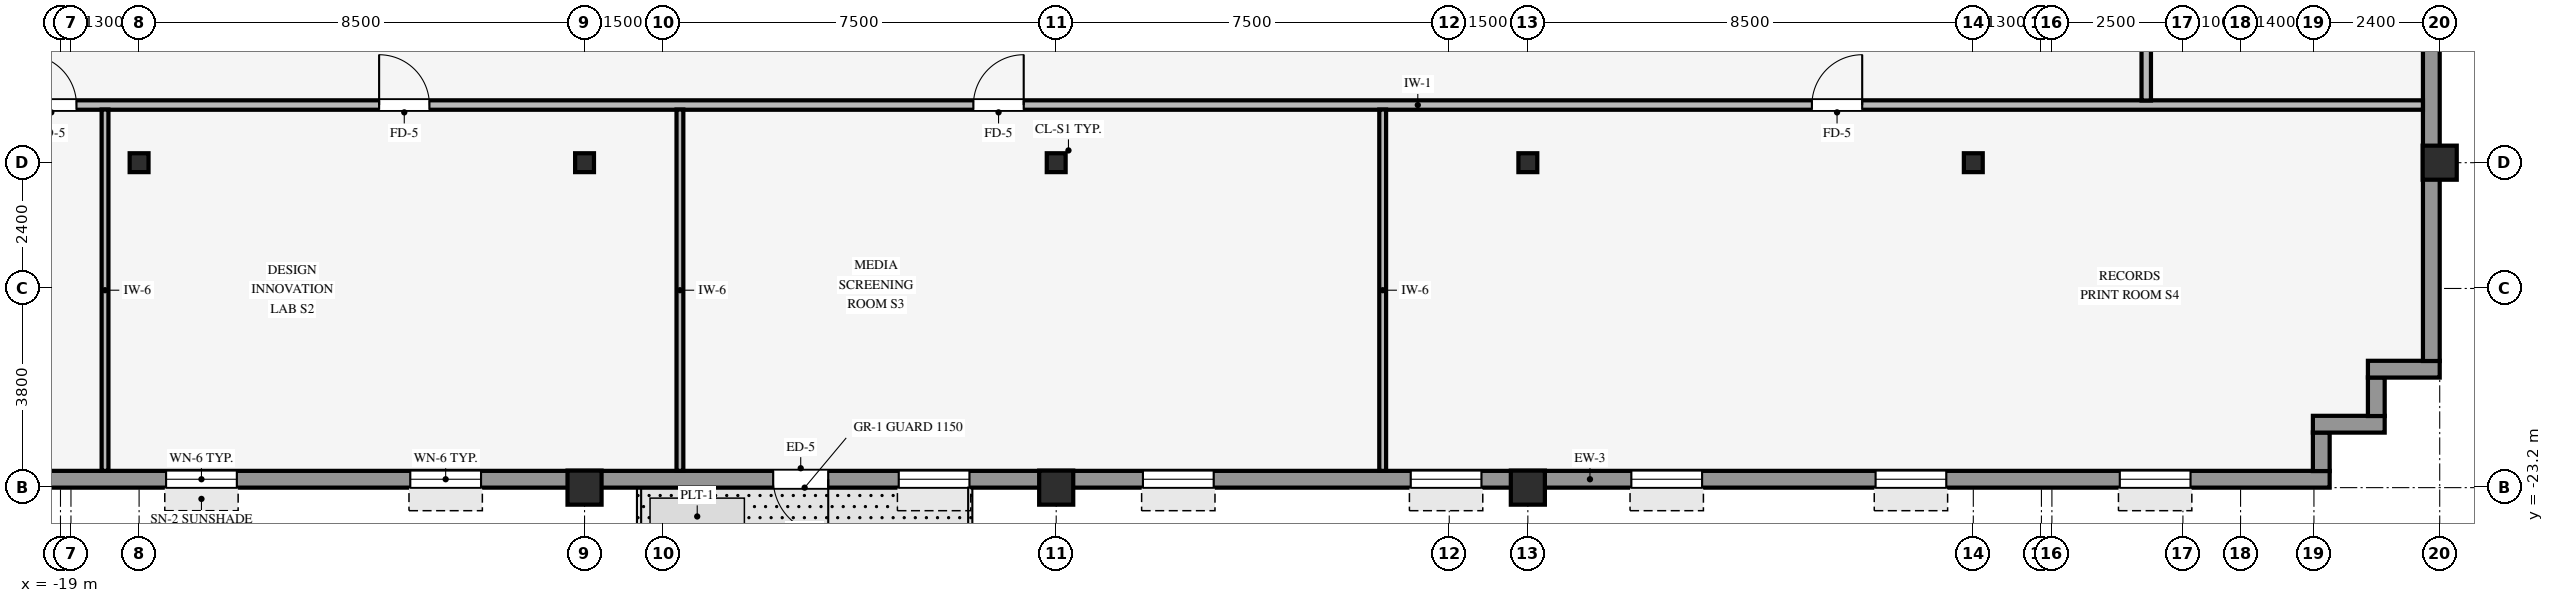
"""IFC4 building model, lengths in metres.
Left out: names, types, materials, properties, quantities, classifications, styles, units other than length and angle.
Written with IfcOpenShell. Run it as: python <this file> out.ifc"""

import sys

from ifc_helpers import new_model, si_unit, direction, frame, frame_2d, origin, origin_2d, place, context, subcontext, project, spatial, rectangle, hollow_rectangle, i_section, extrude, source, transform, mapped, element, fill, save


model = new_model("IFC4")
c1 = context("Model", 3, precision=1e-05, world=origin(), true_north=direction((0.0, 1.0)))
c2 = subcontext(c1, "Body", "Model", "MODEL_VIEW")
j1 = project(units=[si_unit("LENGTHUNIT", "METRE"), si_unit("PLANEANGLEUNIT", "RADIAN")], contexts=[c1])
p1 = place(None, origin())
s1 = spatial("IfcSite", under=j1, at=p1, CompositionType="ELEMENT")
p2 = place(p1, origin())
s2 = spatial("IfcBuilding", under=s1, at=p2, CompositionType="ELEMENT")
p3 = place(p2, frame((0.0, 0.0, 153.05)))
s3 = spatial("IfcBuildingStorey", under=s2, at=p3, CompositionType="ELEMENT", Elevation=153.05)
for number, where, z_axis, x_axis in (
    (1, (26.4, -17.0, 0.0), (0.0, 0.0, 1.0), (1.0, 0.0, 0.0)),
    (2, (-9.0, -23.2, 0.0), (0.0, 0.0, 1.0), (1.0, 0.0, 0.0)),
    (3, (0.0, -23.2, 0.0), (0.0, 0.0, 1.0), (1.0, 0.0, 0.0)),
    (4, (9.0, -23.2, 0.0), (0.0, 0.0, 1.0), (1.0, 0.0, 0.0)),
):
    element("IfcColumn", number, at=place(p3, frame(where, z_axis=z_axis, x_axis=x_axis)), inside=s3, PredefinedType="COLUMN", context=c2, shape_type="SweptSolid", body=[
        extrude(hollow_rectangle(XDim=0.65, YDim=0.65, WallThickness=0.04, InnerFilletRadius=0.04, OuterFilletRadius=0.08, at=origin_2d()), origin(), (0.0, 0.0, 1.0), 3.37),
    ])
for number, where, z_axis, x_axis in (
    (5, (0.0, -17.0, 0.0), (0.0, 0.0, 1.0), (1.0, 0.0, 0.0)),
    (6, (-17.5, -17.0, 0.0), (0.0, 0.0, 1.0), (1.0, 0.0, 0.0)),
    (7, (-9.0, -17.0, 0.0), (0.0, 0.0, 1.0), (1.0, 0.0, 0.0)),
    (8, (9.0, -17.0, 0.0), (0.0, 0.0, 1.0), (1.0, 0.0, 0.0)),
    (9, (17.5, -17.0, 0.0), (0.0, 0.0, 1.0), (1.0, 0.0, 0.0)),
):
    element("IfcColumn", number, at=place(p3, frame(where, z_axis=z_axis, x_axis=x_axis)), inside=s3, PredefinedType="COLUMN", context=c2, shape_type="SweptSolid", body=[
        extrude(i_section(OverallWidth=0.36, OverallDepth=0.36, WebThickness=0.021, FlangeThickness=0.021, FilletRadius=0.018, at=origin_2d()), origin(), (0.0, 0.0, 1.0), 3.37),
    ])
p4 = place(p3, frame((-24.3, -23.04, 0.0), z_axis=(0.0, 0.0, 1.0), x_axis=(1.0, 0.0, 0.0)))
e10 = element("IfcWall", 10, at=p4, inside=s3, PredefinedType="STANDARD", context=c2, shape_type="SweptSolid", body=[
    extrude(rectangle(XDim=48.6, YDim=0.32, at=frame_2d((24.3, 0.0))), origin(), (0.0, 0.0, 1.0), 2.705),
])
p5 = place(p4, frame((19.95, 0.0, 0.0), z_axis=(0.0, 0.0, 1.0), x_axis=(-1.0, 0.0, 0.0)))
e11 = element("IfcOpeningElement", 11, at=p5, cuts=e10, PredefinedType="OPENING", context=c2, shape_type="SweptSolid", body=[
    extrude(rectangle(XDim=1.05, YDim=2.1, at=frame_2d((0.525, 1.05))), frame((0.0, 0.17, 0.0), z_axis=(0.0, -1.0, 0.0), x_axis=(1.0, 0.0, 0.0)), (0.0, 0.0, 1.0), 0.34),
])
p6 = place(p4, frame((2.655, 0.0, 0.8)))
e12 = element("IfcOpeningElement", 12, at=p6, cuts=e10, PredefinedType="OPENING", context=c2, shape_type="SweptSolid", body=[
    extrude(rectangle(XDim=1.35, YDim=1.56, at=frame_2d((0.675, 0.78))), frame((0.0, 0.17, 0.0), z_axis=(0.0, -1.0, 0.0), x_axis=(1.0, 0.0, 0.0)), (0.0, 0.0, 1.0), 0.34),
])
p7 = place(p4, frame((7.315, 0.0, 0.8)))
e13 = element("IfcOpeningElement", 13, at=p7, cuts=e10, PredefinedType="OPENING", context=c2, shape_type="SweptSolid", body=[
    extrude(rectangle(XDim=1.35, YDim=1.56, at=frame_2d((0.675, 0.78))), frame((0.0, 0.17, 0.0), z_axis=(0.0, -1.0, 0.0), x_axis=(1.0, 0.0, 0.0)), (0.0, 0.0, 1.0), 0.34),
])
p8 = place(p4, frame((11.975, 0.0, 0.8)))
e14 = element("IfcOpeningElement", 14, at=p8, cuts=e10, PredefinedType="OPENING", context=c2, shape_type="SweptSolid", body=[
    extrude(rectangle(XDim=1.35, YDim=1.56, at=frame_2d((0.675, 0.78))), frame((0.0, 0.17, 0.0), z_axis=(0.0, -1.0, 0.0), x_axis=(1.0, 0.0, 0.0)), (0.0, 0.0, 1.0), 0.34),
])
p9 = place(p4, frame((21.295, 0.0, 0.8)))
e15 = element("IfcOpeningElement", 15, at=p9, cuts=e10, PredefinedType="OPENING", context=c2, shape_type="SweptSolid", body=[
    extrude(rectangle(XDim=1.35, YDim=1.56, at=frame_2d((0.675, 0.78))), frame((0.0, 0.17, 0.0), z_axis=(0.0, -1.0, 0.0), x_axis=(1.0, 0.0, 0.0)), (0.0, 0.0, 1.0), 0.34),
])
p10 = place(p4, frame((25.955, 0.0, 0.8)))
e16 = element("IfcOpeningElement", 16, at=p10, cuts=e10, PredefinedType="OPENING", context=c2, shape_type="SweptSolid", body=[
    extrude(rectangle(XDim=1.35, YDim=1.56, at=frame_2d((0.675, 0.78))), frame((0.0, 0.17, 0.0), z_axis=(0.0, -1.0, 0.0), x_axis=(1.0, 0.0, 0.0)), (0.0, 0.0, 1.0), 0.34),
])
p11 = place(p4, frame((31.065, 0.0, 0.8)))
e17 = element("IfcOpeningElement", 17, at=p11, cuts=e10, PredefinedType="OPENING", context=c2, shape_type="SweptSolid", body=[
    extrude(rectangle(XDim=1.35, YDim=1.56, at=frame_2d((0.675, 0.78))), frame((0.0, 0.17, 0.0), z_axis=(0.0, -1.0, 0.0), x_axis=(1.0, 0.0, 0.0)), (0.0, 0.0, 1.0), 0.34),
])
p12 = place(p4, frame((35.275, 0.0, 0.8)))
e18 = element("IfcOpeningElement", 18, at=p12, cuts=e10, PredefinedType="OPENING", context=c2, shape_type="SweptSolid", body=[
    extrude(rectangle(XDim=1.35, YDim=1.56, at=frame_2d((0.675, 0.78))), frame((0.0, 0.17, 0.0), z_axis=(0.0, -1.0, 0.0), x_axis=(1.0, 0.0, 0.0)), (0.0, 0.0, 1.0), 0.34),
])
p13 = place(p4, frame((39.935, 0.0, 0.8)))
e19 = element("IfcOpeningElement", 19, at=p13, cuts=e10, PredefinedType="OPENING", context=c2, shape_type="SweptSolid", body=[
    extrude(rectangle(XDim=1.35, YDim=1.56, at=frame_2d((0.675, 0.78))), frame((0.0, 0.17, 0.0), z_axis=(0.0, -1.0, 0.0), x_axis=(1.0, 0.0, 0.0)), (0.0, 0.0, 1.0), 0.34),
])
p14 = place(p4, frame((44.595, 0.0, 0.8)))
e20 = element("IfcOpeningElement", 20, at=p14, cuts=e10, PredefinedType="OPENING", context=c2, shape_type="SweptSolid", body=[
    extrude(rectangle(XDim=1.35, YDim=1.56, at=frame_2d((0.675, 0.78))), frame((0.0, 0.17, 0.0), z_axis=(0.0, -1.0, 0.0), x_axis=(1.0, 0.0, 0.0)), (0.0, 0.0, 1.0), 0.34),
])
p15 = place(p3, frame((24.14, -22.884, 0.0), z_axis=(0.0, 0.0, 1.0), x_axis=(0.0, 1.0, 0.0)))
e21 = element("IfcWall", 21, at=p15, inside=s3, PredefinedType="STANDARD", context=c2, shape_type="SweptSolid", body=[
    extrude(rectangle(XDim=0.738, YDim=0.32, at=frame_2d((0.369, 0.0))), origin(), (0.0, 0.0, 1.0), 3.36),
])
p16 = place(p3, frame((23.98, -21.99, 0.0), z_axis=(0.0, 0.0, 1.0), x_axis=(1.0, 0.0, 0.0)))
e22 = element("IfcWall", 22, at=p16, inside=s3, PredefinedType="STANDARD", context=c2, shape_type="SweptSolid", body=[
    extrude(rectangle(XDim=1.37, YDim=0.32, at=frame_2d((0.685, 0.0))), origin(), (0.0, 0.0, 1.0), 3.36),
])
p17 = place(p3, frame((25.19, -21.834, 0.0), z_axis=(0.0, 0.0, 1.0), x_axis=(0.0, 1.0, 0.0)))
e23 = element("IfcWall", 23, at=p17, inside=s3, PredefinedType="STANDARD", context=c2, shape_type="SweptSolid", body=[
    extrude(rectangle(XDim=0.738, YDim=0.32, at=frame_2d((0.369, 0.0))), origin(), (0.0, 0.0, 1.0), 3.36),
])
p18 = place(p3, frame((25.03, -20.94, 0.0), z_axis=(0.0, 0.0, 1.0), x_axis=(1.0, 0.0, 0.0)))
e24 = element("IfcWall", 24, at=p18, inside=s3, PredefinedType="STANDARD", context=c2, shape_type="SweptSolid", body=[
    extrude(rectangle(XDim=1.37, YDim=0.32, at=frame_2d((0.685, 0.0))), origin(), (0.0, 0.0, 1.0), 3.36),
])
p19 = place(p3, frame((26.24, -20.784, 0.0), z_axis=(0.0, 0.0, 1.0), x_axis=(0.0, 1.0, 0.0)))
e25 = element("IfcWall", 25, at=p19, inside=s3, PredefinedType="STANDARD", context=c2, shape_type="SweptSolid", body=[
    extrude(rectangle(XDim=41.568, YDim=0.32, at=frame_2d((20.784, 0.0))), origin(), (0.0, 0.0, 1.0), 2.705),
])
p20 = place(p19, frame((7.369, 0.0, 0.8)))
e26 = element("IfcOpeningElement", 26, at=p20, cuts=e25, PredefinedType="OPENING", context=c2, shape_type="SweptSolid", body=[
    extrude(rectangle(XDim=2.1, YDim=1.56, at=frame_2d((1.05, 0.78))), frame((0.0, 0.17, 0.0), z_axis=(0.0, -1.0, 0.0), x_axis=(1.0, 0.0, 0.0)), (0.0, 0.0, 1.0), 0.34),
])
p21 = place(p19, frame((12.315, 0.0, 0.8)))
e27 = element("IfcOpeningElement", 27, at=p21, cuts=e25, PredefinedType="OPENING", context=c2, shape_type="SweptSolid", body=[
    extrude(rectangle(XDim=2.1, YDim=1.56, at=frame_2d((1.05, 0.78))), frame((0.0, 0.17, 0.0), z_axis=(0.0, -1.0, 0.0), x_axis=(1.0, 0.0, 0.0)), (0.0, 0.0, 1.0), 0.34),
])
p22 = place(p19, frame((17.261, 0.0, 0.8)))
e28 = element("IfcOpeningElement", 28, at=p22, cuts=e25, PredefinedType="OPENING", context=c2, shape_type="SweptSolid", body=[
    extrude(rectangle(XDim=2.1, YDim=1.56, at=frame_2d((1.05, 0.78))), frame((0.0, 0.17, 0.0), z_axis=(0.0, -1.0, 0.0), x_axis=(1.0, 0.0, 0.0)), (0.0, 0.0, 1.0), 0.34),
])
p23 = place(p19, frame((22.207, 0.0, 0.8)))
e29 = element("IfcOpeningElement", 29, at=p23, cuts=e25, PredefinedType="OPENING", context=c2, shape_type="SweptSolid", body=[
    extrude(rectangle(XDim=2.1, YDim=1.56, at=frame_2d((1.05, 0.78))), frame((0.0, 0.17, 0.0), z_axis=(0.0, -1.0, 0.0), x_axis=(1.0, 0.0, 0.0)), (0.0, 0.0, 1.0), 0.34),
])
p24 = place(p19, frame((27.153, 0.0, 0.8)))
e30 = element("IfcOpeningElement", 30, at=p24, cuts=e25, PredefinedType="OPENING", context=c2, shape_type="SweptSolid", body=[
    extrude(rectangle(XDim=2.1, YDim=1.56, at=frame_2d((1.05, 0.78))), frame((0.0, 0.17, 0.0), z_axis=(0.0, -1.0, 0.0), x_axis=(1.0, 0.0, 0.0)), (0.0, 0.0, 1.0), 0.34),
])
p25 = place(p19, frame((32.099, 0.0, 0.8)))
e31 = element("IfcOpeningElement", 31, at=p25, cuts=e25, PredefinedType="OPENING", context=c2, shape_type="SweptSolid", body=[
    extrude(rectangle(XDim=2.1, YDim=1.56, at=frame_2d((1.05, 0.78))), frame((0.0, 0.17, 0.0), z_axis=(0.0, -1.0, 0.0), x_axis=(1.0, 0.0, 0.0)), (0.0, 0.0, 1.0), 0.34),
])
p26 = place(p3, frame((-26.08, -15.9, 0.0), z_axis=(0.0, 0.0, 1.0), x_axis=(1.0, 0.0, 0.0)))
e32 = element("IfcWall", 32, at=p26, inside=s3, PredefinedType="PARTITIONING", context=c2, shape_type="SweptSolid", body=[
    extrude(rectangle(XDim=52.16, YDim=0.18, at=frame_2d((26.08, 0.0))), origin(), (0.0, 0.0, 1.0), 3.36),
])
p27 = place(p26, frame((24.5, 0.0, 0.0)))
e33 = element("IfcOpeningElement", 33, at=p27, cuts=e32, PredefinedType="OPENING", context=c2, shape_type="SweptSolid", body=[
    extrude(rectangle(XDim=0.96, YDim=2.1, at=frame_2d((0.48, 1.05))), frame((0.0, 0.1, 0.0), z_axis=(0.0, -1.0, 0.0), x_axis=(1.0, 0.0, 0.0)), (0.0, 0.0, 1.0), 0.2),
])
p28 = place(p26, frame((40.5, 0.0, 0.0)))
e34 = element("IfcOpeningElement", 34, at=p28, cuts=e32, PredefinedType="OPENING", context=c2, shape_type="SweptSolid", body=[
    extrude(rectangle(XDim=0.96, YDim=2.1, at=frame_2d((0.48, 1.05))), frame((0.0, 0.1, 0.0), z_axis=(0.0, -1.0, 0.0), x_axis=(1.0, 0.0, 0.0)), (0.0, 0.0, 1.0), 0.2),
])
p29 = place(p26, frame((13.16, 0.0, 0.0)))
e35 = element("IfcOpeningElement", 35, at=p29, cuts=e32, PredefinedType="OPENING", context=c2, shape_type="SweptSolid", body=[
    extrude(rectangle(XDim=0.96, YDim=2.1, at=frame_2d((0.48, 1.05))), frame((0.0, 0.1, 0.0), z_axis=(0.0, -1.0, 0.0), x_axis=(1.0, 0.0, 0.0)), (0.0, 0.0, 1.0), 0.2),
])
p30 = place(p26, frame((6.425, 0.0, 0.0)))
e36 = element("IfcOpeningElement", 36, at=p30, cuts=e32, PredefinedType="OPENING", context=c2, shape_type="SweptSolid", body=[
    extrude(rectangle(XDim=0.96, YDim=2.1, at=frame_2d((0.48, 1.05))), frame((0.0, 0.1, 0.0), z_axis=(0.0, -1.0, 0.0), x_axis=(1.0, 0.0, 0.0)), (0.0, 0.0, 1.0), 0.2),
])
for number, where, z_axis, x_axis in (
    (37, (-18.15, -22.88, 0.0), (0.0, 0.0, 1.0), (0.0, 1.0, 0.0)),
    (38, (-7.18, -22.88, 0.0), (0.0, 0.0, 1.0), (0.0, 1.0, 0.0)),
    (39, (6.23, -22.88, 0.0), (0.0, 0.0, 1.0), (0.0, 1.0, 0.0)),
):
    element("IfcWall", number, at=place(p3, frame(where, z_axis=z_axis, x_axis=x_axis)), inside=s3, PredefinedType="PARTITIONING", context=c2, shape_type="SweptSolid", body=[
        extrude(rectangle(XDim=6.894, YDim=0.13, at=frame_2d((3.447, 0.0))), origin(), (0.0, 0.0, 1.0), 3.36),
    ])
p31 = place(p3, frame((20.8, -15.814, 0.0), z_axis=(0.0, 0.0, 1.0), x_axis=(0.0, 1.0, 0.0)))
e40 = element("IfcWall", 40, at=p31, inside=s3, PredefinedType="PARTITIONING", context=c2, shape_type="SweptSolid", body=[
    extrude(rectangle(XDim=2.228, YDim=0.18, at=frame_2d((1.114, 0.0))), origin(), (0.0, 0.0, 1.0), 3.36),
])
m1 = source(origin(), c2, "Body", "SweptSolid", [
    extrude(rectangle(XDim=1.05, YDim=2.1, at=frame_2d((0.525, 1.05))), frame((0.0, 0.025, 0.0), z_axis=(0.0, -1.0, 0.0), x_axis=(1.0, 0.0, 0.0)), (0.0, 0.0, 1.0), 0.05),
])
p32 = place(p5, origin())
e41 = element("IfcDoor", 41, at=p32, inside=s3, OperationType="SINGLE_SWING_LEFT", PredefinedType="DOOR", context=c2, shape_type="MappedRepresentation", body=[
    mapped(m1, transform((0.0, 0.0, 0.0), scale=1.0)),
])
fill(e11, e41)
m2 = source(origin(), c2, "Body", "SweptSolid", [
    extrude(rectangle(XDim=1.35, YDim=1.56, at=frame_2d((0.675, 0.78))), frame((0.0, 0.03, 0.0), z_axis=(0.0, -1.0, 0.0), x_axis=(1.0, 0.0, 0.0)), (0.0, 0.0, 1.0), 0.06),
])
p33 = place(p7, origin())
e42 = element("IfcWindow", 42, at=p33, inside=s3, PartitioningType="SINGLE_PANEL", PredefinedType="WINDOW", context=c2, shape_type="MappedRepresentation", body=[
    mapped(m2, transform((0.0, 0.0, 0.0), scale=1.0)),
])
fill(e13, e42)
p34 = place(p8, origin())
e43 = element("IfcWindow", 43, at=p34, inside=s3, PartitioningType="SINGLE_PANEL", PredefinedType="WINDOW", context=c2, shape_type="MappedRepresentation", body=[
    mapped(m2, transform((0.0, 0.0, 0.0), scale=1.0)),
])
fill(e14, e43)
p35 = place(p9, origin())
e44 = element("IfcWindow", 44, at=p35, inside=s3, PartitioningType="SINGLE_PANEL", PredefinedType="WINDOW", context=c2, shape_type="MappedRepresentation", body=[
    mapped(m2, transform((0.0, 0.0, 0.0), scale=1.0)),
])
fill(e15, e44)
p36 = place(p10, origin())
e45 = element("IfcWindow", 45, at=p36, inside=s3, PartitioningType="SINGLE_PANEL", PredefinedType="WINDOW", context=c2, shape_type="MappedRepresentation", body=[
    mapped(m2, transform((0.0, 0.0, 0.0), scale=1.0)),
])
fill(e16, e45)
p37 = place(p11, origin())
e46 = element("IfcWindow", 46, at=p37, inside=s3, PartitioningType="SINGLE_PANEL", PredefinedType="WINDOW", context=c2, shape_type="MappedRepresentation", body=[
    mapped(m2, transform((0.0, 0.0, 0.0), scale=1.0)),
])
fill(e17, e46)
p38 = place(p12, origin())
e47 = element("IfcWindow", 47, at=p38, inside=s3, PartitioningType="SINGLE_PANEL", PredefinedType="WINDOW", context=c2, shape_type="MappedRepresentation", body=[
    mapped(m2, transform((0.0, 0.0, 0.0), scale=1.0)),
])
fill(e18, e47)
p39 = place(p13, origin())
e48 = element("IfcWindow", 48, at=p39, inside=s3, PartitioningType="SINGLE_PANEL", PredefinedType="WINDOW", context=c2, shape_type="MappedRepresentation", body=[
    mapped(m2, transform((0.0, 0.0, 0.0), scale=1.0)),
])
fill(e19, e48)
p40 = place(p14, origin())
e49 = element("IfcWindow", 49, at=p40, inside=s3, PartitioningType="SINGLE_PANEL", PredefinedType="WINDOW", context=c2, shape_type="MappedRepresentation", body=[
    mapped(m2, transform((0.0, 0.0, 0.0), scale=1.0)),
])
fill(e20, e49)
m3 = source(origin(), c2, "Body", "SweptSolid", [
    extrude(rectangle(XDim=0.96, YDim=2.1, at=frame_2d((0.48, 1.05))), frame((0.0, 0.025, 0.0), z_axis=(0.0, -1.0, 0.0), x_axis=(1.0, 0.0, 0.0)), (0.0, 0.0, 1.0), 0.05),
])
p41 = place(p27, origin())
e50 = element("IfcDoor", 50, at=p41, inside=s3, OperationType="SINGLE_SWING_RIGHT", PredefinedType="DOOR", context=c2, shape_type="MappedRepresentation", body=[
    mapped(m3, transform((0.0, 0.0, 0.0), scale=1.0)),
])
fill(e33, e50)
p42 = place(p28, origin())
e51 = element("IfcDoor", 51, at=p42, inside=s3, OperationType="SINGLE_SWING_RIGHT", PredefinedType="DOOR", context=c2, shape_type="MappedRepresentation", body=[
    mapped(m3, transform((0.0, 0.0, 0.0), scale=1.0)),
])
fill(e34, e51)
p43 = place(p29, origin())
e52 = element("IfcDoor", 52, at=p43, inside=s3, OperationType="SINGLE_SWING_LEFT", PredefinedType="DOOR", context=c2, shape_type="MappedRepresentation", body=[
    mapped(m3, transform((0.0, 0.0, 0.0), scale=1.0)),
])
fill(e35, e52)
p44 = place(p30, origin())
e53 = element("IfcDoor", 53, at=p44, inside=s3, OperationType="SINGLE_SWING_LEFT", PredefinedType="DOOR", context=c2, shape_type="MappedRepresentation", body=[
    mapped(m3, transform((0.0, 0.0, 0.0), scale=1.0)),
])
fill(e36, e53)
save(model, sys.argv[1])
